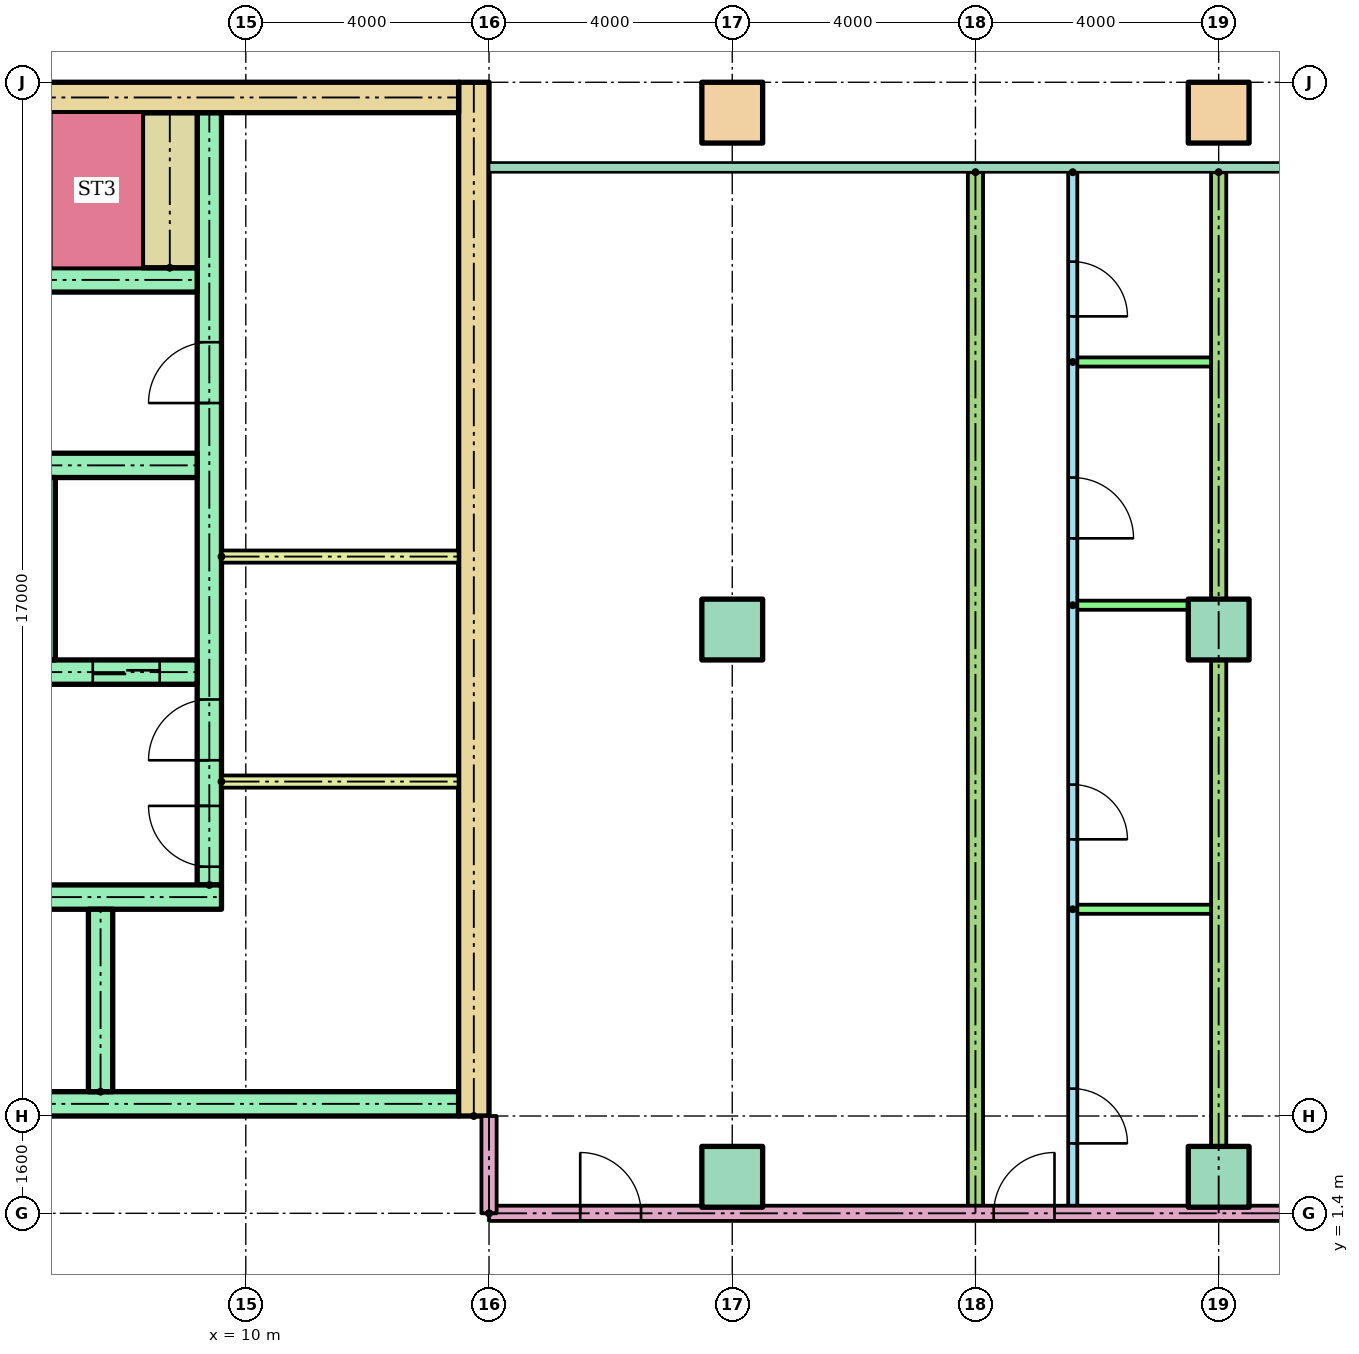
"""IFC4 building model, lengths in metres.
Left out: names, types, materials, properties, quantities, classifications, styles, units other than length and angle.
Written with IfcOpenShell. Run it as: python <this file> out.ifc"""

import sys

from ifc_helpers import new_model, si_unit, direction, frame, frame_2d, origin, origin_2d, place, context, subcontext, project, spatial, rectangle, hollow_rectangle, extrude, element, fill, save


model = new_model("IFC4")
c1 = context("Model", 3, precision=1e-05, world=origin(), true_north=direction((0.0, 1.0)))
c2 = subcontext(c1, "Body", "Model", "MODEL_VIEW")
j1 = project(units=[si_unit("LENGTHUNIT", "METRE"), si_unit("PLANEANGLEUNIT", "RADIAN")], contexts=[c1])
p1 = place(None, origin())
s1 = spatial("IfcSite", under=j1, at=p1, CompositionType="ELEMENT")
p2 = place(p1, origin())
s2 = spatial("IfcBuilding", under=s1, at=p2, CompositionType="ELEMENT")
p3 = place(p2, frame((0.0, 0.0, 33.8)))
s3 = spatial("IfcBuildingStorey", under=s2, at=p3, CompositionType="ELEMENT", Elevation=33.8)
for number, where in (
    (1, (18.0, 2.0, 0.0)),
    (2, (26.0, 2.0, 0.0)),
    (3, (18.0, 11.0, 0.0)),
    (4, (26.0, 11.0, 0.0)),
):
    element("IfcColumn", number, at=place(p3, frame(where)), inside=s3, PredefinedType="COLUMN", context=c2, shape_type="SweptSolid", body=[
        extrude(rectangle(XDim=1.0, YDim=1.0, at=origin_2d()), origin(), (0.0, 0.0, 1.0), 3.9),
    ])
for number, where in (
    (5, (18.0, 19.5, 0.0)),
    (6, (26.0, 19.5, 0.0)),
):
    element("IfcColumn", number, at=place(p3, frame(where)), inside=s3, PredefinedType="COLUMN", context=c2, shape_type="SweptSolid", body=[
        extrude(hollow_rectangle(XDim=1.0, YDim=1.0, WallThickness=0.05, at=origin_2d()), origin(), (0.0, 0.0, 1.0), 3.9),
    ])
p4 = place(p3, frame((13.75, 3.0, 0.0), z_axis=(0.0, 0.0, 1.0), x_axis=(0.0, 1.0, 0.0)))
e7 = element("IfcWall", 7, at=p4, inside=s3, PredefinedType="SHEAR", context=c2, shape_type="SweptSolid", body=[
    extrude(rectangle(XDim=17.0, YDim=0.5, at=frame_2d((8.5, 0.0))), origin(), (0.0, 0.0, 1.0), 3.6),
])
p5 = place(p3, frame((-13.5, 19.75, 0.0)))
e8 = element("IfcWall", 8, at=p5, inside=s3, PredefinedType="SHEAR", context=c2, shape_type="SweptSolid", body=[
    extrude(rectangle(XDim=27.0, YDim=0.5, at=frame_2d((13.5, 0.0))), origin(), (0.0, 0.0, 1.0), 3.6),
])
p6 = place(p3, frame((9.4, 6.8, 0.0), z_axis=(0.0, 0.0, 1.0), x_axis=(0.0, 1.0, 0.0)))
e9 = element("IfcWall", 9, at=p6, inside=s3, PredefinedType="SHEAR", context=c2, shape_type="SweptSolid", body=[
    extrude(rectangle(XDim=12.7, YDim=0.4, at=frame_2d((6.35, 0.0))), origin(), (0.0, 0.0, 1.0), 3.6),
])
p7 = place(p6, frame((0.3, 0.0, 0.0)))
e10 = element("IfcOpeningElement", 10, at=p7, cuts=e9, PredefinedType="OPENING", context=c2, shape_type="SweptSolid", body=[
    extrude(rectangle(XDim=1.0, YDim=2.1, at=frame_2d((0.5, 1.05))), frame((0.0, 0.21, 0.0), z_axis=(0.0, -1.0, 0.0), x_axis=(1.0, 0.0, 0.0)), (0.0, 0.0, 1.0), 0.42),
])
p8 = place(p6, frame((2.05, 0.0, 0.0)))
e11 = element("IfcOpeningElement", 11, at=p8, cuts=e9, PredefinedType="OPENING", context=c2, shape_type="SweptSolid", body=[
    extrude(rectangle(XDim=1.0, YDim=2.1, at=frame_2d((0.5, 1.05))), frame((0.0, 0.21, 0.0), z_axis=(0.0, -1.0, 0.0), x_axis=(1.0, 0.0, 0.0)), (0.0, 0.0, 1.0), 0.42),
])
p9 = place(p6, frame((7.925, 0.0, 0.0)))
e12 = element("IfcOpeningElement", 12, at=p9, cuts=e9, PredefinedType="OPENING", context=c2, shape_type="SweptSolid", body=[
    extrude(rectangle(XDim=1.0, YDim=2.1, at=frame_2d((0.5, 1.05))), frame((0.0, 0.21, 0.0), z_axis=(0.0, -1.0, 0.0), x_axis=(1.0, 0.0, 0.0)), (0.0, 0.0, 1.0), 0.42),
])
p10 = place(p3, frame((-13.5, 3.2, 0.0)))
e13 = element("IfcWall", 13, at=p10, inside=s3, PredefinedType="SHEAR", context=c2, shape_type="SweptSolid", body=[
    extrude(rectangle(XDim=27.0, YDim=0.4, at=frame_2d((13.5, 0.0))), origin(), (0.0, 0.0, 1.0), 3.6),
])
p11 = place(p10, frame((6.861, 0.0, 0.0)))
e14 = element("IfcOpeningElement", 14, at=p11, cuts=e13, PredefinedType="OPENING", context=c2, shape_type="SweptSolid", body=[
    extrude(rectangle(XDim=1.1, YDim=2.1, at=frame_2d((0.55, 1.05))), frame((0.0, 0.21, 0.0), z_axis=(0.0, -1.0, 0.0), x_axis=(1.0, 0.0, 0.0)), (0.0, 0.0, 1.0), 0.42),
])
p12 = place(p10, frame((9.906, 0.0, 0.0)))
e15 = element("IfcOpeningElement", 15, at=p12, cuts=e13, PredefinedType="OPENING", context=c2, shape_type="SweptSolid", body=[
    extrude(rectangle(XDim=1.1, YDim=2.1, at=frame_2d((0.55, 1.05))), frame((0.0, 0.21, 0.0), z_axis=(0.0, -1.0, 0.0), x_axis=(1.0, 0.0, 0.0)), (0.0, 0.0, 1.0), 0.42),
])
p13 = place(p10, frame((15.994, 0.0, 0.0)))
e16 = element("IfcOpeningElement", 16, at=p13, cuts=e13, PredefinedType="OPENING", context=c2, shape_type="SweptSolid", body=[
    extrude(rectangle(XDim=1.1, YDim=2.1, at=frame_2d((0.55, 1.05))), frame((0.0, 0.21, 0.0), z_axis=(0.0, -1.0, 0.0), x_axis=(1.0, 0.0, 0.0)), (0.0, 0.0, 1.0), 0.42),
])
p14 = place(p10, frame((19.039, 0.0, 0.0)))
e17 = element("IfcOpeningElement", 17, at=p14, cuts=e13, PredefinedType="OPENING", context=c2, shape_type="SweptSolid", body=[
    extrude(rectangle(XDim=1.1, YDim=2.1, at=frame_2d((0.55, 1.05))), frame((0.0, 0.21, 0.0), z_axis=(0.0, -1.0, 0.0), x_axis=(1.0, 0.0, 0.0)), (0.0, 0.0, 1.0), 0.42),
])
p15 = place(p10, frame((12.6, 0.0, 0.0)))
e18 = element("IfcOpeningElement", 18, at=p15, cuts=e13, PredefinedType="OPENING", context=c2, shape_type="SweptSolid", body=[
    extrude(rectangle(XDim=1.8, YDim=2.1, at=frame_2d((0.9, 1.05))), frame((0.0, 0.21, 0.0), z_axis=(0.0, -1.0, 0.0), x_axis=(1.0, 0.0, 0.0)), (0.0, 0.0, 1.0), 0.42),
])
p16 = place(p3, frame((1.522, 6.6, 0.0)))
e19 = element("IfcWall", 19, at=p16, inside=s3, PredefinedType="SHEAR", context=c2, shape_type="SweptSolid", body=[
    extrude(rectangle(XDim=8.078, YDim=0.4, at=frame_2d((4.039, 0.0))), origin(), (0.0, 0.0, 1.0), 3.6),
])
p17 = place(p3, frame((7.611, 3.4, 0.0), z_axis=(0.0, 0.0, 1.0), x_axis=(0.0, 1.0, 0.0)))
e20 = element("IfcWall", 20, at=p17, inside=s3, PredefinedType="SHEAR", context=c2, shape_type="SweptSolid", body=[
    extrude(rectangle(XDim=3.0, YDim=0.4, at=frame_2d((1.5, 0.0))), origin(), (0.0, 0.0, 1.0), 3.6),
])
p18 = place(p3, frame((1.2, 10.3, 0.0)))
e21 = element("IfcWall", 21, at=p18, inside=s3, PredefinedType="SHEAR", context=c2, shape_type="SweptSolid", body=[
    extrude(rectangle(XDim=8.0, YDim=0.4, at=frame_2d((4.0, 0.0))), origin(), (0.0, 0.0, 1.0), 3.6),
])
p19 = place(p18, frame((3.55, 0.0, 0.0)))
e22 = element("IfcOpeningElement", 22, at=p19, cuts=e21, PredefinedType="OPENING", context=c2, shape_type="SweptSolid", body=[
    extrude(rectangle(XDim=1.1, YDim=2.1, at=frame_2d((0.55, 1.05))), frame((0.0, 0.21, 0.0), z_axis=(0.0, -1.0, 0.0), x_axis=(1.0, 0.0, 0.0)), (0.0, 0.0, 1.0), 0.42),
])
p20 = place(p18, frame((6.283, 0.0, 0.0)))
e23 = element("IfcOpeningElement", 23, at=p20, cuts=e21, PredefinedType="OPENING", context=c2, shape_type="SweptSolid", body=[
    extrude(rectangle(XDim=1.1, YDim=2.1, at=frame_2d((0.55, 1.05))), frame((0.0, 0.21, 0.0), z_axis=(0.0, -1.0, 0.0), x_axis=(1.0, 0.0, 0.0)), (0.0, 0.0, 1.0), 0.42),
])
p21 = place(p18, frame((0.867, 0.0, 0.0)))
e24 = element("IfcOpeningElement", 24, at=p21, cuts=e21, PredefinedType="OPENING", context=c2, shape_type="SweptSolid", body=[
    extrude(rectangle(XDim=1.0, YDim=2.1, at=frame_2d((0.5, 1.05))), frame((0.0, 0.21, 0.0), z_axis=(0.0, -1.0, 0.0), x_axis=(1.0, 0.0, 0.0)), (0.0, 0.0, 1.0), 0.42),
])
p22 = place(p3, frame((1.2, 13.7, 0.0)))
e25 = element("IfcWall", 25, at=p22, inside=s3, PredefinedType="SHEAR", context=c2, shape_type="SweptSolid", body=[
    extrude(rectangle(XDim=8.0, YDim=0.4, at=frame_2d((4.0, 0.0))), origin(), (0.0, 0.0, 1.0), 3.6),
])
p23 = place(p3, frame((6.667, 10.5, 0.0), z_axis=(0.0, 0.0, 1.0), x_axis=(0.0, 1.0, 0.0)))
e26 = element("IfcWall", 26, at=p23, inside=s3, PredefinedType="SHEAR", context=c2, shape_type="SweptSolid", body=[
    extrude(rectangle(XDim=3.0, YDim=0.4, at=frame_2d((1.5, 0.0))), origin(), (0.0, 0.0, 1.0), 3.6),
])
p24 = place(p3, frame((-9.2, 16.75, 0.0)))
e27 = element("IfcWall", 27, at=p24, inside=s3, PredefinedType="SHEAR", context=c2, shape_type="SweptSolid", body=[
    extrude(rectangle(XDim=18.4, YDim=0.4, at=frame_2d((9.2, 0.0))), origin(), (0.0, 0.0, 1.0), 3.6),
])
p25 = place(p24, frame((0.1, 0.0, 0.0)))
e28 = element("IfcOpeningElement", 28, at=p25, cuts=e27, PredefinedType="OPENING", context=c2, shape_type="SweptSolid", body=[
    extrude(rectangle(XDim=0.95, YDim=2.1, at=frame_2d((0.475, 1.05))), frame((0.0, 0.21, 0.0), z_axis=(0.0, -1.0, 0.0), x_axis=(1.0, 0.0, 0.0)), (0.0, 0.0, 1.0), 0.42),
])
p26 = place(p24, frame((6.1, 0.0, 0.0)))
e29 = element("IfcOpeningElement", 29, at=p26, cuts=e27, PredefinedType="OPENING", context=c2, shape_type="SweptSolid", body=[
    extrude(rectangle(XDim=0.95, YDim=2.1, at=frame_2d((0.475, 1.05))), frame((0.0, 0.21, 0.0), z_axis=(0.0, -1.0, 0.0), x_axis=(1.0, 0.0, 0.0)), (0.0, 0.0, 1.0), 0.42),
])
p27 = place(p24, frame((12.1, 0.0, 0.0)))
e30 = element("IfcOpeningElement", 30, at=p27, cuts=e27, PredefinedType="OPENING", context=c2, shape_type="SweptSolid", body=[
    extrude(rectangle(XDim=0.95, YDim=2.1, at=frame_2d((0.475, 1.05))), frame((0.0, 0.21, 0.0), z_axis=(0.0, -1.0, 0.0), x_axis=(1.0, 0.0, 0.0)), (0.0, 0.0, 1.0), 0.42),
])
p28 = place(p3, frame((8.75, 16.95, 0.0), z_axis=(0.0, 0.0, 1.0), x_axis=(0.0, 1.0, 0.0)))
e31 = element("IfcWall", 31, at=p28, inside=s3, PredefinedType="SHEAR", context=c2, shape_type="SweptSolid", body=[
    extrude(rectangle(XDim=2.55, YDim=0.9, at=frame_2d((1.275, 0.0))), origin(), (0.0, 0.0, 1.0), 3.6),
])
for number, where in (
    (32, (9.6, 8.5, 0.0)),
    (33, (9.6, 12.2, 0.0)),
):
    element("IfcWall", number, at=place(p3, frame(where)), inside=s3, PredefinedType="PARTITIONING", context=c2, shape_type="SweptSolid", body=[
        extrude(rectangle(XDim=3.9, YDim=0.2, at=frame_2d((1.95, 0.0))), origin(), (0.0, 0.0, 1.0), 3.6),
    ])
p29 = place(p3, frame((14.0, 1.4, 0.0)))
e34 = element("IfcWall", 34, at=p29, inside=s3, PredefinedType="PARTITIONING", context=c2, shape_type="SweptSolid", body=[
    extrude(rectangle(XDim=15.0, YDim=0.25, at=frame_2d((7.5, 0.0))), origin(), (0.0, 0.0, 1.0), 3.1),
])
p30 = place(p29, frame((1.5, 0.0, 0.0)))
e35 = element("IfcOpeningElement", 35, at=p30, cuts=e34, PredefinedType="OPENING", context=c2, shape_type="SweptSolid", body=[
    extrude(rectangle(XDim=1.0, YDim=2.1, at=frame_2d((0.5, 1.05))), frame((0.0, 0.135, 0.0), z_axis=(0.0, -1.0, 0.0), x_axis=(1.0, 0.0, 0.0)), (0.0, 0.0, 1.0), 0.27),
])
p31 = place(p29, frame((8.3, 0.0, 0.0)))
e36 = element("IfcOpeningElement", 36, at=p31, cuts=e34, PredefinedType="OPENING", context=c2, shape_type="SweptSolid", body=[
    extrude(rectangle(XDim=1.0, YDim=2.1, at=frame_2d((0.5, 1.05))), frame((0.0, 0.135, 0.0), z_axis=(0.0, -1.0, 0.0), x_axis=(1.0, 0.0, 0.0)), (0.0, 0.0, 1.0), 0.27),
])
p32 = place(p29, frame((13.5, 0.0, 0.0)))
e37 = element("IfcOpeningElement", 37, at=p32, cuts=e34, PredefinedType="OPENING", context=c2, shape_type="SweptSolid", body=[
    extrude(rectangle(XDim=1.0, YDim=2.1, at=frame_2d((0.5, 1.05))), frame((0.0, 0.135, 0.0), z_axis=(0.0, -1.0, 0.0), x_axis=(1.0, 0.0, 0.0)), (0.0, 0.0, 1.0), 0.27),
])
p33 = place(p3, frame((23.6, 18.521, 0.0), z_axis=(0.0, 0.0, 1.0), x_axis=(0.0, -1.0, 0.0)))
e38 = element("IfcWall", 38, at=p33, inside=s3, PredefinedType="PARTITIONING", context=c2, shape_type="SweptSolid", body=[
    extrude(rectangle(XDim=17.121, YDim=0.15, at=frame_2d((8.561, 0.0))), origin(), (0.0, 0.0, 1.0), 3.1),
])
p34 = place(p33, frame((15.071, 0.0, 0.0)))
e39 = element("IfcOpeningElement", 39, at=p34, cuts=e38, PredefinedType="OPENING", context=c2, shape_type="SweptSolid", body=[
    extrude(rectangle(XDim=0.9, YDim=2.1, at=frame_2d((0.45, 1.05))), frame((0.0, 0.085, 0.0), z_axis=(0.0, -1.0, 0.0), x_axis=(1.0, 0.0, 0.0)), (0.0, 0.0, 1.0), 0.17),
])
p35 = place(p33, frame((10.071, 0.0, 0.0)))
e40 = element("IfcOpeningElement", 40, at=p35, cuts=e38, PredefinedType="OPENING", context=c2, shape_type="SweptSolid", body=[
    extrude(rectangle(XDim=0.9, YDim=2.1, at=frame_2d((0.45, 1.05))), frame((0.0, 0.085, 0.0), z_axis=(0.0, -1.0, 0.0), x_axis=(1.0, 0.0, 0.0)), (0.0, 0.0, 1.0), 0.17),
])
p36 = place(p33, frame((5.021, 0.0, 0.0)))
e41 = element("IfcOpeningElement", 41, at=p36, cuts=e38, PredefinedType="OPENING", context=c2, shape_type="SweptSolid", body=[
    extrude(rectangle(XDim=1.0, YDim=2.1, at=frame_2d((0.5, 1.05))), frame((0.0, 0.085, 0.0), z_axis=(0.0, -1.0, 0.0), x_axis=(1.0, 0.0, 0.0)), (0.0, 0.0, 1.0), 0.17),
])
p37 = place(p33, frame((1.471, 0.0, 0.0)))
e42 = element("IfcOpeningElement", 42, at=p37, cuts=e38, PredefinedType="OPENING", context=c2, shape_type="SweptSolid", body=[
    extrude(rectangle(XDim=0.9, YDim=2.1, at=frame_2d((0.45, 1.05))), frame((0.0, 0.085, 0.0), z_axis=(0.0, -1.0, 0.0), x_axis=(1.0, 0.0, 0.0)), (0.0, 0.0, 1.0), 0.17),
])
for number, where in (
    (43, (23.6, 6.4, 0.0)),
    (44, (23.6, 11.4, 0.0)),
    (45, (23.6, 15.4, 0.0)),
):
    element("IfcWall", number, at=place(p3, frame(where)), inside=s3, PredefinedType="PARTITIONING", context=c2, shape_type="SweptSolid", body=[
        extrude(rectangle(XDim=2.4, YDim=0.15, at=frame_2d((1.2, 0.0))), origin(), (0.0, 0.0, 1.0), 3.1),
    ])
for number, where, z_axis, x_axis in (
    (46, (22.0, 18.521, 0.0), (0.0, 0.0, 1.0), (0.0, -1.0, 0.0)),
    (47, (26.0, 18.521, 0.0), (0.0, 0.0, 1.0), (0.0, -1.0, 0.0)),
):
    element("IfcWall", number, at=place(p3, frame(where, z_axis=z_axis, x_axis=x_axis)), inside=s3, PredefinedType="PARTITIONING", context=c2, shape_type="SweptSolid", body=[
        extrude(rectangle(XDim=17.121, YDim=0.25, at=frame_2d((8.561, 0.0))), origin(), (0.0, 0.0, 1.0), 3.1),
    ])
p38 = place(p3, frame((14.0, 1.4, 0.0), z_axis=(0.0, 0.0, 1.0), x_axis=(0.0, 1.0, 0.0)))
e48 = element("IfcWall", 48, at=p38, inside=s3, PredefinedType="PARTITIONING", context=c2, shape_type="SweptSolid", body=[
    extrude(rectangle(XDim=1.6, YDim=0.25, at=frame_2d((0.8, 0.0))), origin(), (0.0, 0.0, 1.0), 3.1),
])
p39 = place(p20, origin())
e49 = element("IfcDoor", 49, at=p39, inside=s3, OperationType="SLIDING_TO_LEFT", PredefinedType="DOOR", context=c2, shape_type="SweptSolid", body=[
    extrude(rectangle(XDim=1.1, YDim=2.1, at=frame_2d((0.55, 1.05))), frame((0.0, 0.025, 0.0), z_axis=(0.0, -1.0, 0.0), x_axis=(1.0, 0.0, 0.0)), (0.0, 0.0, 1.0), 0.05),
])
fill(e23, e49)
p40 = place(p7, origin())
e50 = element("IfcDoor", 50, at=p40, inside=s3, OperationType="SINGLE_SWING_RIGHT", PredefinedType="DOOR", context=c2, shape_type="SweptSolid", body=[
    extrude(rectangle(XDim=1.0, YDim=2.1, at=frame_2d((0.5, 1.05))), frame((0.0, 0.025, 0.0), z_axis=(0.0, -1.0, 0.0), x_axis=(1.0, 0.0, 0.0)), (0.0, 0.0, 1.0), 0.05),
])
fill(e10, e50)
p41 = place(p8, origin())
e51 = element("IfcDoor", 51, at=p41, inside=s3, OperationType="SINGLE_SWING_LEFT", PredefinedType="DOOR", context=c2, shape_type="SweptSolid", body=[
    extrude(rectangle(XDim=1.0, YDim=2.1, at=frame_2d((0.5, 1.05))), frame((0.0, 0.025, 0.0), z_axis=(0.0, -1.0, 0.0), x_axis=(1.0, 0.0, 0.0)), (0.0, 0.0, 1.0), 0.05),
])
fill(e11, e51)
p42 = place(p9, origin())
e52 = element("IfcDoor", 52, at=p42, inside=s3, OperationType="SINGLE_SWING_LEFT", PredefinedType="DOOR", context=c2, shape_type="SweptSolid", body=[
    extrude(rectangle(XDim=1.0, YDim=2.1, at=frame_2d((0.5, 1.05))), frame((0.0, 0.025, 0.0), z_axis=(0.0, -1.0, 0.0), x_axis=(1.0, 0.0, 0.0)), (0.0, 0.0, 1.0), 0.05),
])
fill(e12, e52)
p43 = place(p30, origin())
e53 = element("IfcDoor", 53, at=p43, inside=s3, OperationType="SINGLE_SWING_LEFT", PredefinedType="DOOR", context=c2, shape_type="SweptSolid", body=[
    extrude(rectangle(XDim=1.0, YDim=2.1, at=frame_2d((0.5, 1.05))), frame((0.0, 0.025, 0.0), z_axis=(0.0, -1.0, 0.0), x_axis=(1.0, 0.0, 0.0)), (0.0, 0.0, 1.0), 0.05),
])
fill(e35, e53)
p44 = place(p34, origin())
e54 = element("IfcDoor", 54, at=p44, inside=s3, OperationType="SINGLE_SWING_RIGHT", PredefinedType="DOOR", context=c2, shape_type="SweptSolid", body=[
    extrude(rectangle(XDim=0.9, YDim=2.1, at=frame_2d((0.45, 1.05))), frame((0.0, 0.025, 0.0), z_axis=(0.0, -1.0, 0.0), x_axis=(1.0, 0.0, 0.0)), (0.0, 0.0, 1.0), 0.05),
])
fill(e39, e54)
p45 = place(p35, origin())
e55 = element("IfcDoor", 55, at=p45, inside=s3, OperationType="SINGLE_SWING_RIGHT", PredefinedType="DOOR", context=c2, shape_type="SweptSolid", body=[
    extrude(rectangle(XDim=0.9, YDim=2.1, at=frame_2d((0.45, 1.05))), frame((0.0, 0.025, 0.0), z_axis=(0.0, -1.0, 0.0), x_axis=(1.0, 0.0, 0.0)), (0.0, 0.0, 1.0), 0.05),
])
fill(e40, e55)
p46 = place(p36, origin())
e56 = element("IfcDoor", 56, at=p46, inside=s3, OperationType="SINGLE_SWING_RIGHT", PredefinedType="DOOR", context=c2, shape_type="SweptSolid", body=[
    extrude(rectangle(XDim=1.0, YDim=2.1, at=frame_2d((0.5, 1.05))), frame((0.0, 0.025, 0.0), z_axis=(0.0, -1.0, 0.0), x_axis=(1.0, 0.0, 0.0)), (0.0, 0.0, 1.0), 0.05),
])
fill(e41, e56)
p47 = place(p37, origin())
e57 = element("IfcDoor", 57, at=p47, inside=s3, OperationType="SINGLE_SWING_RIGHT", PredefinedType="DOOR", context=c2, shape_type="SweptSolid", body=[
    extrude(rectangle(XDim=0.9, YDim=2.1, at=frame_2d((0.45, 1.05))), frame((0.0, 0.025, 0.0), z_axis=(0.0, -1.0, 0.0), x_axis=(1.0, 0.0, 0.0)), (0.0, 0.0, 1.0), 0.05),
])
fill(e42, e57)
p48 = place(p31, origin())
e58 = element("IfcDoor", 58, at=p48, inside=s3, OperationType="SINGLE_SWING_RIGHT", PredefinedType="DOOR", context=c2, shape_type="SweptSolid", body=[
    extrude(rectangle(XDim=1.0, YDim=2.1, at=frame_2d((0.5, 1.05))), frame((0.0, 0.025, 0.0), z_axis=(0.0, -1.0, 0.0), x_axis=(1.0, 0.0, 0.0)), (0.0, 0.0, 1.0), 0.05),
])
fill(e36, e58)
save(model, sys.argv[1])
